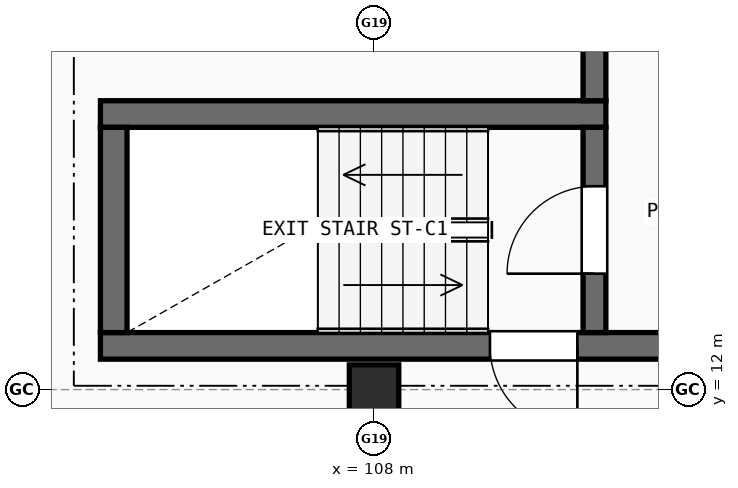
"""IFC4 building model, lengths in metres.
Left out: names, types, materials, properties, quantities, classifications, styles, units other than length and angle.
Written with IfcOpenShell. Run it as: python <this file> out.ifc"""

import sys

from ifc_helpers import new_model, si_unit, direction, frame, frame_2d, origin, origin_2d, place, context, subcontext, project, spatial, rectangle, extrude, element, fill, save


model = new_model("IFC4")
c1 = context("Model", 3, precision=1e-05, world=origin(), true_north=direction((0.0, 1.0)))
c2 = subcontext(c1, "Body", "Model", "MODEL_VIEW")
j1 = project(units=[si_unit("LENGTHUNIT", "METRE"), si_unit("PLANEANGLEUNIT", "RADIAN")], contexts=[c1])
p1 = place(None, origin())
s1 = spatial("IfcSite", under=j1, at=p1, CompositionType="ELEMENT")
p2 = place(p1, origin())
s2 = spatial("IfcBuilding", under=s1, at=p2, CompositionType="ELEMENT")
p3 = place(p2, frame((0.0, 0.0, 14.1)))
s3 = spatial("IfcBuildingStorey", under=s2, at=p3, CompositionType="ELEMENT", Elevation=14.1)
p4 = place(p3, frame((108.0, 12.0, 0.0), z_axis=(0.0, 0.0, 1.0), x_axis=(1.0, 0.0, 0.0)))
e1 = element("IfcColumn", 1, at=p4, inside=s3, PredefinedType="COLUMN", context=c2, shape_type="SweptSolid", body=[
    extrude(rectangle(XDim=0.65, YDim=0.65, at=origin_2d()), origin(), (0.0, 0.0, 1.0), 2.95),
])
p5 = place(p3, frame((104.4, 12.575, 0.0), z_axis=(0.0, 0.0, 1.0), x_axis=(1.0, 0.0, 0.0)))
e2 = element("IfcWall", 2, at=p5, inside=s3, PredefinedType="SHEAR", context=c2, shape_type="SweptSolid", body=[
    extrude(rectangle(XDim=11.4, YDim=0.35, at=frame_2d((5.7, 0.0))), origin(), (0.0, 0.0, 1.0), 2.95),
])
p6 = place(p5, frame((5.125, 0.0, 0.0)))
e3 = element("IfcOpeningElement", 3, at=p6, cuts=e2, PredefinedType="OPENING", context=c2, shape_type="SweptSolid", body=[
    extrude(rectangle(XDim=1.15, YDim=2.15, at=frame_2d((0.575, 1.075))), frame((0.0, 0.185, 0.0), z_axis=(0.0, -1.0, 0.0), x_axis=(1.0, 0.0, 0.0)), (0.0, 0.0, 1.0), 0.37),
])
p7 = place(p3, frame((111.05, 15.625, 0.0), z_axis=(0.0, 0.0, 1.0), x_axis=(-1.0, 0.0, 0.0)))
e4 = element("IfcWall", 4, at=p7, inside=s3, PredefinedType="SHEAR", context=c2, shape_type="SweptSolid", body=[
    extrude(rectangle(XDim=6.65, YDim=0.35, at=frame_2d((3.325, 0.0))), origin(), (0.0, 0.0, 1.0), 2.95),
])
p8 = place(p3, frame((104.575, 15.45, 0.0), z_axis=(0.0, 0.0, 1.0), x_axis=(0.0, -1.0, 0.0)))
e5 = element("IfcWall", 5, at=p8, inside=s3, PredefinedType="SHEAR", context=c2, shape_type="SweptSolid", body=[
    extrude(rectangle(XDim=2.7, YDim=0.35, at=frame_2d((1.35, 0.0))), origin(), (0.0, 0.0, 1.0), 2.95),
])
p9 = place(p3, frame((110.9, 12.75, 0.0), z_axis=(0.0, 0.0, 1.0), x_axis=(0.0, 1.0, 0.0)))
e6 = element("IfcWall", 6, at=p9, inside=s3, PredefinedType="SHEAR", context=c2, shape_type="SweptSolid", body=[
    extrude(rectangle(XDim=2.7, YDim=0.3, at=frame_2d((1.35, 0.0))), origin(), (0.0, 0.0, 1.0), 2.95),
])
p10 = place(p9, frame((0.775, 0.0, 0.0)))
e7 = element("IfcOpeningElement", 7, at=p10, cuts=e6, PredefinedType="OPENING", context=c2, shape_type="SweptSolid", body=[
    extrude(rectangle(XDim=1.15, YDim=2.15, at=frame_2d((0.575, 1.075))), frame((0.0, 0.16, 0.0), z_axis=(0.0, -1.0, 0.0), x_axis=(1.0, 0.0, 0.0)), (0.0, 0.0, 1.0), 0.32),
])
p11 = place(p3, frame((110.9, 15.8, 0.0), z_axis=(0.0, 0.0, 1.0), x_axis=(0.0, 1.0, 0.0)))
e8 = element("IfcWall", 8, at=p11, inside=s3, PredefinedType="SHEAR", context=c2, shape_type="SweptSolid", body=[
    extrude(rectangle(XDim=3.35, YDim=0.3, at=frame_2d((1.675, 0.0))), origin(), (0.0, 0.0, 1.0), 2.95),
])
p12 = place(p6, origin())
e9 = element("IfcDoor", 9, at=p12, inside=s3, OperationType="SINGLE_SWING_RIGHT", PredefinedType="DOOR", context=c2, shape_type="SweptSolid", body=[
    extrude(rectangle(XDim=1.15, YDim=2.15, at=frame_2d((0.575, 1.075))), frame((0.0, 0.025, 0.0), z_axis=(0.0, -1.0, 0.0), x_axis=(1.0, 0.0, 0.0)), (0.0, 0.0, 1.0), 0.05),
])
fill(e3, e9)
p13 = place(p10, origin())
e10 = element("IfcDoor", 10, at=p13, inside=s3, OperationType="SINGLE_SWING_LEFT", PredefinedType="DOOR", context=c2, shape_type="SweptSolid", body=[
    extrude(rectangle(XDim=1.15, YDim=2.15, at=frame_2d((0.575, 1.075))), frame((0.0, 0.025, 0.0), z_axis=(0.0, -1.0, 0.0), x_axis=(1.0, 0.0, 0.0)), (0.0, 0.0, 1.0), 0.05),
])
fill(e7, e10)
save(model, sys.argv[1])
